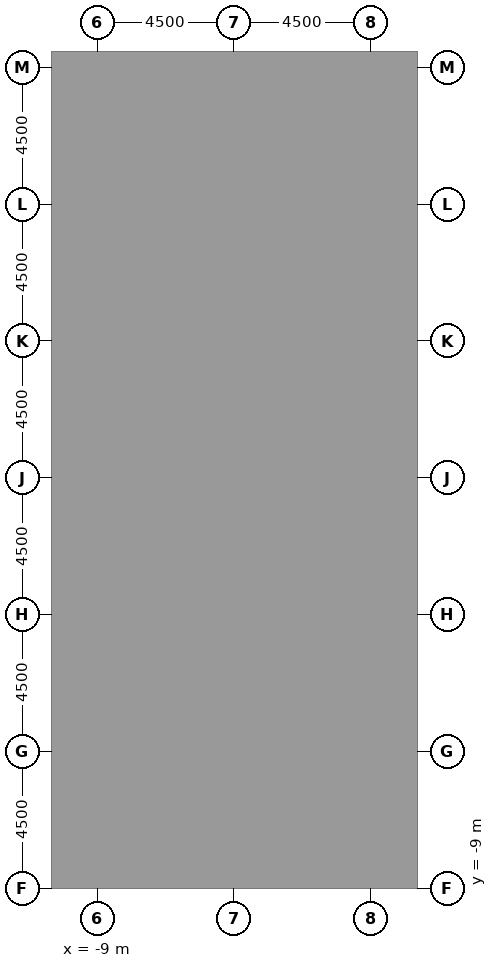
"""IFC4 building model, lengths in metres.
Left out: names, types, materials, properties, quantities, classifications, styles, units other than length and angle.
Written with IfcOpenShell. Run it as: python <this file> out.ifc"""

import sys

from ifc_helpers import new_model, si_unit, direction, frame, frame_2d, origin, place, context, subcontext, project, spatial, rectangle, extrude, element, fill, save


model = new_model("IFC4")
c1 = context("Model", 3, precision=1e-05, world=origin(), true_north=direction((0.0, 1.0)))
c2 = subcontext(c1, "Body", "Model", "MODEL_VIEW")
j1 = project(units=[si_unit("LENGTHUNIT", "METRE"), si_unit("PLANEANGLEUNIT", "RADIAN")], contexts=[c1])
p1 = place(None, origin())
s1 = spatial("IfcSite", under=j1, at=p1, CompositionType="ELEMENT")
p2 = place(p1, origin())
s2 = spatial("IfcBuilding", under=s1, at=p2, CompositionType="ELEMENT")
p3 = place(p2, origin())
s3 = spatial("IfcBuildingStorey", under=s2, at=p3, CompositionType="ELEMENT", Elevation=0.0)
p4 = place(p3, frame((-10.0, -9.0, 0.0), z_axis=(0.0, 0.0, 1.0), x_axis=(0.0, 1.0, 0.0)))
e1 = element("IfcWall", 1, at=p4, inside=s3, PredefinedType="SHEAR", context=c2, shape_type="SweptSolid", body=[
    extrude(rectangle(XDim=27.5, YDim=1.0, at=frame_2d((13.75, 0.0))), origin(), (0.0, 0.0, 1.0), 7.2),
])
p5 = place(p4, frame((12.55, 0.0, 0.0)))
e2 = element("IfcOpeningElement", 2, at=p5, cuts=e1, PredefinedType="OPENING", context=c2, shape_type="SweptSolid", body=[
    extrude(rectangle(XDim=2.4, YDim=2.4, at=frame_2d((1.2, 1.2))), frame((0.0, 0.51, 0.0), z_axis=(0.0, -1.0, 0.0), x_axis=(1.0, 0.0, 0.0)), (0.0, 0.0, 1.0), 1.02),
])
p6 = place(p4, frame((6.825, 0.0, 0.0)))
e3 = element("IfcOpeningElement", 3, at=p6, cuts=e1, PredefinedType="OPENING", context=c2, shape_type="SweptSolid", body=[
    extrude(rectangle(XDim=1.2, YDim=2.1, at=frame_2d((0.6, 1.05))), frame((0.0, 0.51, 0.0), z_axis=(0.0, -1.0, 0.0), x_axis=(1.0, 0.0, 0.0)), (0.0, 0.0, 1.0), 1.02),
])
p7 = place(p4, frame((19.475, 0.0, 0.0)))
e4 = element("IfcOpeningElement", 4, at=p7, cuts=e1, PredefinedType="OPENING", context=c2, shape_type="SweptSolid", body=[
    extrude(rectangle(XDim=1.2, YDim=2.1, at=frame_2d((0.6, 1.05))), frame((0.0, 0.51, 0.0), z_axis=(0.0, -1.0, 0.0), x_axis=(1.0, 0.0, 0.0)), (0.0, 0.0, 1.0), 1.02),
])
p8 = place(p3, frame((1.0, -9.0, 0.0), z_axis=(0.0, 0.0, 1.0), x_axis=(0.0, 1.0, 0.0)))
e5 = element("IfcWall", 5, at=p8, inside=s3, PredefinedType="SHEAR", context=c2, shape_type="SweptSolid", body=[
    extrude(rectangle(XDim=27.5, YDim=1.0, at=frame_2d((13.75, 0.0))), origin(), (0.0, 0.0, 1.0), 7.2),
])
p9 = place(p8, frame((12.55, 0.0, 0.0)))
e6 = element("IfcOpeningElement", 6, at=p9, cuts=e5, PredefinedType="OPENING", context=c2, shape_type="SweptSolid", body=[
    extrude(rectangle(XDim=2.4, YDim=2.4, at=frame_2d((1.2, 1.2))), frame((0.0, 0.51, 0.0), z_axis=(0.0, -1.0, 0.0), x_axis=(1.0, 0.0, 0.0)), (0.0, 0.0, 1.0), 1.02),
])
p10 = place(p8, frame((3.955, 0.0, 0.0)))
e7 = element("IfcOpeningElement", 7, at=p10, cuts=e5, PredefinedType="OPENING", context=c2, shape_type="SweptSolid", body=[
    extrude(rectangle(XDim=0.905, YDim=2.1, at=frame_2d((0.453, 1.05))), frame((0.0, 0.51, 0.0), z_axis=(0.0, -1.0, 0.0), x_axis=(1.0, 0.0, 0.0)), (0.0, 0.0, 1.0), 1.02),
])
p11 = place(p8, frame((23.363, 0.0, 0.0)))
e8 = element("IfcOpeningElement", 8, at=p11, cuts=e5, PredefinedType="OPENING", context=c2, shape_type="SweptSolid", body=[
    extrude(rectangle(XDim=1.2, YDim=2.1, at=frame_2d((0.6, 1.05))), frame((0.0, 0.51, 0.0), z_axis=(0.0, -1.0, 0.0), x_axis=(1.0, 0.0, 0.0)), (0.0, 0.0, 1.0), 1.02),
])
for number, where, z_axis, x_axis in (
    (9, (-9.5, -8.5, 0.0), (0.0, 0.0, 1.0), (1.0, 0.0, 0.0)),
    (10, (-9.5, 18.0, 0.0), (0.0, 0.0, 1.0), (1.0, 0.0, 0.0)),
):
    element("IfcWall", number, at=place(p3, frame(where, z_axis=z_axis, x_axis=x_axis)), inside=s3, PredefinedType="SHEAR", context=c2, shape_type="SweptSolid", body=[
        extrude(rectangle(XDim=10.0, YDim=1.0, at=frame_2d((5.0, 0.0))), origin(), (0.0, 0.0, 1.0), 7.2),
    ])
p12 = place(p3, frame((-9.5, -0.5, 0.0), z_axis=(0.0, 0.0, 1.0), x_axis=(1.0, 0.0, 0.0)))
e11 = element("IfcWall", 11, at=p12, inside=s3, PredefinedType="SHEAR", context=c2, shape_type="SweptSolid", body=[
    extrude(rectangle(XDim=10.0, YDim=0.5, at=frame_2d((5.0, 0.0))), origin(), (0.0, 0.0, 1.0), 7.2),
])
p13 = place(p3, frame((-9.5, 2.8, 0.0), z_axis=(0.0, 0.0, 1.0), x_axis=(1.0, 0.0, 0.0)))
e12 = element("IfcWall", 12, at=p13, inside=s3, PredefinedType="SHEAR", context=c2, shape_type="SweptSolid", body=[
    extrude(rectangle(XDim=10.0, YDim=0.5, at=frame_2d((5.0, 0.0))), origin(), (0.0, 0.0, 1.0), 7.2),
])
p14 = place(p13, frame((0.512, 0.0, 0.0)))
e13 = element("IfcOpeningElement", 13, at=p14, cuts=e12, PredefinedType="OPENING", context=c2, shape_type="SweptSolid", body=[
    extrude(rectangle(XDim=1.1, YDim=2.1, at=frame_2d((0.55, 1.05))), frame((0.0, 0.26, 0.0), z_axis=(0.0, -1.0, 0.0), x_axis=(1.0, 0.0, 0.0)), (0.0, 0.0, 1.0), 0.52),
])
p15 = place(p13, frame((3.137, 0.0, 0.0)))
e14 = element("IfcOpeningElement", 14, at=p15, cuts=e12, PredefinedType="OPENING", context=c2, shape_type="SweptSolid", body=[
    extrude(rectangle(XDim=1.1, YDim=2.1, at=frame_2d((0.55, 1.05))), frame((0.0, 0.26, 0.0), z_axis=(0.0, -1.0, 0.0), x_axis=(1.0, 0.0, 0.0)), (0.0, 0.0, 1.0), 0.52),
])
p16 = place(p13, frame((5.762, 0.0, 0.0)))
e15 = element("IfcOpeningElement", 15, at=p16, cuts=e12, PredefinedType="OPENING", context=c2, shape_type="SweptSolid", body=[
    extrude(rectangle(XDim=1.1, YDim=2.1, at=frame_2d((0.55, 1.05))), frame((0.0, 0.26, 0.0), z_axis=(0.0, -1.0, 0.0), x_axis=(1.0, 0.0, 0.0)), (0.0, 0.0, 1.0), 0.52),
])
p17 = place(p13, frame((8.387, 0.0, 0.0)))
e16 = element("IfcOpeningElement", 16, at=p17, cuts=e12, PredefinedType="OPENING", context=c2, shape_type="SweptSolid", body=[
    extrude(rectangle(XDim=1.1, YDim=2.1, at=frame_2d((0.55, 1.05))), frame((0.0, 0.26, 0.0), z_axis=(0.0, -1.0, 0.0), x_axis=(1.0, 0.0, 0.0)), (0.0, 0.0, 1.0), 0.52),
])
p18 = place(p3, frame((-9.5, 6.7, 0.0), z_axis=(0.0, 0.0, 1.0), x_axis=(1.0, 0.0, 0.0)))
e17 = element("IfcWall", 17, at=p18, inside=s3, PredefinedType="SHEAR", context=c2, shape_type="SweptSolid", body=[
    extrude(rectangle(XDim=10.0, YDim=0.5, at=frame_2d((5.0, 0.0))), origin(), (0.0, 0.0, 1.0), 7.2),
])
p19 = place(p18, frame((0.512, 0.0, 0.0)))
e18 = element("IfcOpeningElement", 18, at=p19, cuts=e17, PredefinedType="OPENING", context=c2, shape_type="SweptSolid", body=[
    extrude(rectangle(XDim=1.1, YDim=2.1, at=frame_2d((0.55, 1.05))), frame((0.0, 0.26, 0.0), z_axis=(0.0, -1.0, 0.0), x_axis=(1.0, 0.0, 0.0)), (0.0, 0.0, 1.0), 0.52),
])
p20 = place(p18, frame((3.188, 0.0, 0.0)))
e19 = element("IfcOpeningElement", 19, at=p20, cuts=e17, PredefinedType="OPENING", context=c2, shape_type="SweptSolid", body=[
    extrude(rectangle(XDim=1.0, YDim=2.1, at=frame_2d((0.5, 1.05))), frame((0.0, 0.26, 0.0), z_axis=(0.0, -1.0, 0.0), x_axis=(1.0, 0.0, 0.0)), (0.0, 0.0, 1.0), 0.52),
])
p21 = place(p18, frame((5.812, 0.0, 0.0)))
e20 = element("IfcOpeningElement", 20, at=p21, cuts=e17, PredefinedType="OPENING", context=c2, shape_type="SweptSolid", body=[
    extrude(rectangle(XDim=1.0, YDim=2.1, at=frame_2d((0.5, 1.05))), frame((0.0, 0.26, 0.0), z_axis=(0.0, -1.0, 0.0), x_axis=(1.0, 0.0, 0.0)), (0.0, 0.0, 1.0), 0.52),
])
p22 = place(p18, frame((8.438, 0.0, 0.0)))
e21 = element("IfcOpeningElement", 21, at=p22, cuts=e17, PredefinedType="OPENING", context=c2, shape_type="SweptSolid", body=[
    extrude(rectangle(XDim=1.0, YDim=2.1, at=frame_2d((0.5, 1.05))), frame((0.0, 0.26, 0.0), z_axis=(0.0, -1.0, 0.0), x_axis=(1.0, 0.0, 0.0)), (0.0, 0.0, 1.0), 0.52),
])
p23 = place(p3, frame((-9.5, 10.0, 0.0), z_axis=(0.0, 0.0, 1.0), x_axis=(1.0, 0.0, 0.0)))
e22 = element("IfcWall", 22, at=p23, inside=s3, PredefinedType="SHEAR", context=c2, shape_type="SweptSolid", body=[
    extrude(rectangle(XDim=10.0, YDim=0.5, at=frame_2d((5.0, 0.0))), origin(), (0.0, 0.0, 1.0), 7.2),
])
for number, where, z_axis, x_axis in (
    (23, (-7.125, -0.25, 0.0), (0.0, 0.0, 1.0), (0.0, 1.0, 0.0)),
    (24, (-7.125, 6.95, 0.0), (0.0, 0.0, 1.0), (0.0, 1.0, 0.0)),
    (25, (-4.5, -0.25, 0.0), (0.0, 0.0, 1.0), (0.0, 1.0, 0.0)),
    (26, (-4.5, 6.95, 0.0), (0.0, 0.0, 1.0), (0.0, 1.0, 0.0)),
    (27, (-1.875, -0.25, 0.0), (0.0, 0.0, 1.0), (0.0, 1.0, 0.0)),
    (28, (-1.875, 6.95, 0.0), (0.0, 0.0, 1.0), (0.0, 1.0, 0.0)),
):
    element("IfcWall", number, at=place(p3, frame(where, z_axis=z_axis, x_axis=x_axis)), inside=s3, PredefinedType="SHEAR", context=c2, shape_type="SweptSolid", body=[
        extrude(rectangle(XDim=2.8, YDim=0.5, at=frame_2d((1.4, 0.0))), origin(), (0.0, 0.0, 1.0), 7.2),
    ])
for number, where, z_axis, x_axis in (
    (29, (-4.5, -8.0, 0.0), (0.0, 0.0, 1.0), (0.0, 1.0, 0.0)),
    (30, (-4.5, 10.25, 0.0), (0.0, 0.0, 1.0), (0.0, 1.0, 0.0)),
):
    element("IfcWall", number, at=place(p3, frame(where, z_axis=z_axis, x_axis=x_axis)), inside=s3, PredefinedType="SHEAR", context=c2, shape_type="SweptSolid", body=[
        extrude(rectangle(XDim=7.25, YDim=0.5, at=frame_2d((3.625, 0.0))), origin(), (0.0, 0.0, 1.0), 7.2),
    ])
p24 = place(p3, frame((-4.25, -5.245, 0.0), z_axis=(0.0, 0.0, 1.0), x_axis=(1.0, 0.0, 0.0)))
e31 = element("IfcWall", 31, at=p24, inside=s3, PredefinedType="PARTITIONING", context=c2, shape_type="SweptSolid", body=[
    extrude(rectangle(XDim=4.75, YDim=0.1, at=frame_2d((2.375, 0.0))), origin(), (0.0, 0.0, 1.0), 6.75),
])
p25 = place(p24, frame((1.875, 0.0, 0.0)))
e32 = element("IfcOpeningElement", 32, at=p25, cuts=e31, PredefinedType="OPENING", context=c2, shape_type="SweptSolid", body=[
    extrude(rectangle(XDim=1.0, YDim=2.1, at=frame_2d((0.5, 1.05))), frame((0.0, 0.06, 0.0), z_axis=(0.0, -1.0, 0.0), x_axis=(1.0, 0.0, 0.0)), (0.0, 0.0, 1.0), 0.12),
])
p26 = place(p3, frame((-2.445, -3.94, 0.0), z_axis=(0.0, 0.0, 1.0), x_axis=(1.0, 0.0, 0.0)))
e33 = element("IfcWall", 33, at=p26, inside=s3, PredefinedType="PARTITIONING", context=c2, shape_type="SweptSolid", body=[
    extrude(rectangle(XDim=2.945, YDim=0.1, at=frame_2d((1.473, 0.0))), origin(), (0.0, 0.0, 1.0), 6.75),
])
p27 = place(p26, frame((0.972, 0.0, 0.0)))
e34 = element("IfcOpeningElement", 34, at=p27, cuts=e33, PredefinedType="OPENING", context=c2, shape_type="SweptSolid", body=[
    extrude(rectangle(XDim=1.0, YDim=2.1, at=frame_2d((0.5, 1.05))), frame((0.0, 0.06, 0.0), z_axis=(0.0, -1.0, 0.0), x_axis=(1.0, 0.0, 0.0)), (0.0, 0.0, 1.0), 0.12),
])
p28 = place(p3, frame((-4.25, -3.94, 0.0), z_axis=(0.0, 0.0, 1.0), x_axis=(1.0, 0.0, 0.0)))
e35 = element("IfcWall", 35, at=p28, inside=s3, PredefinedType="PARTITIONING", context=c2, shape_type="SweptSolid", body=[
    extrude(rectangle(XDim=1.805, YDim=0.1, at=frame_2d((0.902, 0.0))), origin(), (0.0, 0.0, 1.0), 6.75),
])
p29 = place(p28, frame((0.403, 0.0, 0.0)))
e36 = element("IfcOpeningElement", 36, at=p29, cuts=e35, PredefinedType="OPENING", context=c2, shape_type="SweptSolid", body=[
    extrude(rectangle(XDim=1.0, YDim=2.1, at=frame_2d((0.5, 1.05))), frame((0.0, 0.06, 0.0), z_axis=(0.0, -1.0, 0.0), x_axis=(1.0, 0.0, 0.0)), (0.0, 0.0, 1.0), 0.12),
])
p30 = place(p3, frame((-2.445, -3.94, 0.0), z_axis=(0.0, 0.0, 1.0), x_axis=(0.0, 1.0, 0.0)))
e37 = element("IfcWall", 37, at=p30, inside=s3, PredefinedType="PARTITIONING", context=c2, shape_type="SweptSolid", body=[
    extrude(rectangle(XDim=3.19, YDim=0.1, at=frame_2d((1.595, 0.0))), origin(), (0.0, 0.0, 1.0), 6.75),
])
p31 = place(p3, frame((-0.8, 12.425, 0.0), z_axis=(0.0, 0.0, 1.0), x_axis=(1.0, 0.0, 0.0)))
e38 = element("IfcWall", 38, at=p31, inside=s3, PredefinedType="PARTITIONING", context=c2, shape_type="SweptSolid", body=[
    extrude(rectangle(XDim=1.3, YDim=0.1, at=frame_2d((0.65, 0.0))), origin(), (0.0, 0.0, 1.0), 6.75),
])
p32 = place(p31, frame((0.2, 0.0, 0.0)))
e39 = element("IfcOpeningElement", 39, at=p32, cuts=e38, PredefinedType="OPENING", context=c2, shape_type="SweptSolid", body=[
    extrude(rectangle(XDim=0.9, YDim=2.1, at=frame_2d((0.45, 1.05))), frame((0.0, 0.06, 0.0), z_axis=(0.0, -1.0, 0.0), x_axis=(1.0, 0.0, 0.0)), (0.0, 0.0, 1.0), 0.12),
])
p33 = place(p3, frame((-4.25, 12.425, 0.0), z_axis=(0.0, 0.0, 1.0), x_axis=(1.0, 0.0, 0.0)))
e40 = element("IfcWall", 40, at=p33, inside=s3, PredefinedType="PARTITIONING", context=c2, shape_type="SweptSolid", body=[
    extrude(rectangle(XDim=3.45, YDim=0.1, at=frame_2d((1.725, 0.0))), origin(), (0.0, 0.0, 1.0), 6.75),
])
p34 = place(p3, frame((-0.8, 12.425, 0.0), z_axis=(0.0, 0.0, 1.0), x_axis=(0.0, 1.0, 0.0)))
e41 = element("IfcWall", 41, at=p34, inside=s3, PredefinedType="PARTITIONING", context=c2, shape_type="SweptSolid", body=[
    extrude(rectangle(XDim=2.537, YDim=0.1, at=frame_2d((1.269, 0.0))), origin(), (0.0, 0.0, 1.0), 6.75),
])
p35 = place(p34, frame((0.769, 0.0, 0.0)))
e42 = element("IfcOpeningElement", 42, at=p35, cuts=e41, PredefinedType="OPENING", context=c2, shape_type="SweptSolid", body=[
    extrude(rectangle(XDim=1.0, YDim=2.1, at=frame_2d((0.5, 1.05))), frame((0.0, 0.06, 0.0), z_axis=(0.0, -1.0, 0.0), x_axis=(1.0, 0.0, 0.0)), (0.0, 0.0, 1.0), 0.12),
])
p36 = place(p3, frame((-0.8, 14.962, 0.0), z_axis=(0.0, 0.0, 1.0), x_axis=(0.0, 1.0, 0.0)))
e43 = element("IfcWall", 43, at=p36, inside=s3, PredefinedType="PARTITIONING", context=c2, shape_type="SweptSolid", body=[
    extrude(rectangle(XDim=2.538, YDim=0.1, at=frame_2d((1.269, 0.0))), origin(), (0.0, 0.0, 1.0), 6.75),
])
p37 = place(p36, frame((0.769, 0.0, 0.0)))
e44 = element("IfcOpeningElement", 44, at=p37, cuts=e43, PredefinedType="OPENING", context=c2, shape_type="SweptSolid", body=[
    extrude(rectangle(XDim=1.0, YDim=2.1, at=frame_2d((0.5, 1.05))), frame((0.0, 0.06, 0.0), z_axis=(0.0, -1.0, 0.0), x_axis=(1.0, 0.0, 0.0)), (0.0, 0.0, 1.0), 0.12),
])
p38 = place(p3, frame((-4.25, 14.962, 0.0), z_axis=(0.0, 0.0, 1.0), x_axis=(1.0, 0.0, 0.0)))
e45 = element("IfcWall", 45, at=p38, inside=s3, PredefinedType="PARTITIONING", context=c2, shape_type="SweptSolid", body=[
    extrude(rectangle(XDim=3.45, YDim=0.1, at=frame_2d((1.725, 0.0))), origin(), (0.0, 0.0, 1.0), 6.75),
])
p39 = place(p3, frame((-12.7, -9.0, 0.0), z_axis=(0.0, 0.0, 1.0), x_axis=(1.0, 0.0, 0.0)))
e46 = element("IfcWall", 46, at=p39, inside=s3, PredefinedType="PARTITIONING", context=c2, shape_type="SweptSolid", body=[
    extrude(rectangle(XDim=2.2, YDim=0.15, at=frame_2d((1.1, 0.0))), origin(), (0.0, 0.0, 1.0), 6.75),
])
p40 = place(p39, frame((0.25, 0.0, 0.0)))
e47 = element("IfcOpeningElement", 47, at=p40, cuts=e46, PredefinedType="OPENING", context=c2, shape_type="SweptSolid", body=[
    extrude(rectangle(XDim=1.7, YDim=2.1, at=frame_2d((0.85, 1.05))), frame((0.0, 0.085, 0.0), z_axis=(0.0, -1.0, 0.0), x_axis=(1.0, 0.0, 0.0)), (0.0, 0.0, 1.0), 0.17),
])
p41 = place(p3, frame((-12.7, 18.5, 0.0), z_axis=(0.0, 0.0, 1.0), x_axis=(1.0, 0.0, 0.0)))
e48 = element("IfcWall", 48, at=p41, inside=s3, PredefinedType="PARTITIONING", context=c2, shape_type="SweptSolid", body=[
    extrude(rectangle(XDim=2.2, YDim=0.15, at=frame_2d((1.1, 0.0))), origin(), (0.0, 0.0, 1.0), 6.75),
])
p42 = place(p41, frame((0.25, 0.0, 0.0)))
e49 = element("IfcOpeningElement", 49, at=p42, cuts=e48, PredefinedType="OPENING", context=c2, shape_type="SweptSolid", body=[
    extrude(rectangle(XDim=1.7, YDim=2.1, at=frame_2d((0.85, 1.05))), frame((0.0, 0.085, 0.0), z_axis=(0.0, -1.0, 0.0), x_axis=(1.0, 0.0, 0.0)), (0.0, 0.0, 1.0), 0.17),
])
p43 = place(p14, origin())
e50 = element("IfcDoor", 50, at=p43, inside=s3, OperationType="DOUBLE_DOOR_SLIDING", PredefinedType="DOOR", context=c2, shape_type="SweptSolid", body=[
    extrude(rectangle(XDim=1.1, YDim=2.1, at=frame_2d((0.55, 1.05))), frame((0.0, 0.025, 0.0), z_axis=(0.0, -1.0, 0.0), x_axis=(1.0, 0.0, 0.0)), (0.0, 0.0, 1.0), 0.05),
])
fill(e13, e50)
p44 = place(p15, origin())
e51 = element("IfcDoor", 51, at=p44, inside=s3, OperationType="DOUBLE_DOOR_SLIDING", PredefinedType="DOOR", context=c2, shape_type="SweptSolid", body=[
    extrude(rectangle(XDim=1.1, YDim=2.1, at=frame_2d((0.55, 1.05))), frame((0.0, 0.025, 0.0), z_axis=(0.0, -1.0, 0.0), x_axis=(1.0, 0.0, 0.0)), (0.0, 0.0, 1.0), 0.05),
])
fill(e14, e51)
p45 = place(p16, origin())
e52 = element("IfcDoor", 52, at=p45, inside=s3, OperationType="DOUBLE_DOOR_SLIDING", PredefinedType="DOOR", context=c2, shape_type="SweptSolid", body=[
    extrude(rectangle(XDim=1.1, YDim=2.1, at=frame_2d((0.55, 1.05))), frame((0.0, 0.025, 0.0), z_axis=(0.0, -1.0, 0.0), x_axis=(1.0, 0.0, 0.0)), (0.0, 0.0, 1.0), 0.05),
])
fill(e15, e52)
p46 = place(p17, origin())
e53 = element("IfcDoor", 53, at=p46, inside=s3, OperationType="DOUBLE_DOOR_SLIDING", PredefinedType="DOOR", context=c2, shape_type="SweptSolid", body=[
    extrude(rectangle(XDim=1.1, YDim=2.1, at=frame_2d((0.55, 1.05))), frame((0.0, 0.025, 0.0), z_axis=(0.0, -1.0, 0.0), x_axis=(1.0, 0.0, 0.0)), (0.0, 0.0, 1.0), 0.05),
])
fill(e16, e53)
p47 = place(p19, origin())
e54 = element("IfcDoor", 54, at=p47, inside=s3, OperationType="DOUBLE_DOOR_SLIDING", PredefinedType="DOOR", context=c2, shape_type="SweptSolid", body=[
    extrude(rectangle(XDim=1.1, YDim=2.1, at=frame_2d((0.55, 1.05))), frame((0.0, 0.025, 0.0), z_axis=(0.0, -1.0, 0.0), x_axis=(1.0, 0.0, 0.0)), (0.0, 0.0, 1.0), 0.05),
])
fill(e18, e54)
p48 = place(p5, origin())
e55 = element("IfcDoor", 55, at=p48, inside=s3, OperationType="DOUBLE_DOOR_DOUBLE_SWING", PredefinedType="DOOR", context=c2, shape_type="SweptSolid", body=[
    extrude(rectangle(XDim=2.4, YDim=2.4, at=frame_2d((1.2, 1.2))), frame((0.0, 0.025, 0.0), z_axis=(0.0, -1.0, 0.0), x_axis=(1.0, 0.0, 0.0)), (0.0, 0.0, 1.0), 0.05),
])
fill(e2, e55)
p49 = place(p9, origin())
e56 = element("IfcDoor", 56, at=p49, inside=s3, OperationType="DOUBLE_DOOR_DOUBLE_SWING", PredefinedType="DOOR", context=c2, shape_type="SweptSolid", body=[
    extrude(rectangle(XDim=2.4, YDim=2.4, at=frame_2d((1.2, 1.2))), frame((0.0, 0.025, 0.0), z_axis=(0.0, -1.0, 0.0), x_axis=(1.0, 0.0, 0.0)), (0.0, 0.0, 1.0), 0.05),
])
fill(e6, e56)
p50 = place(p6, origin())
e57 = element("IfcDoor", 57, at=p50, inside=s3, OperationType="SINGLE_SWING_LEFT", PredefinedType="DOOR", context=c2, shape_type="SweptSolid", body=[
    extrude(rectangle(XDim=1.2, YDim=2.1, at=frame_2d((0.6, 1.05))), frame((0.0, 0.025, 0.0), z_axis=(0.0, -1.0, 0.0), x_axis=(1.0, 0.0, 0.0)), (0.0, 0.0, 1.0), 0.05),
])
fill(e3, e57)
p51 = place(p7, origin())
e58 = element("IfcDoor", 58, at=p51, inside=s3, OperationType="SINGLE_SWING_LEFT", PredefinedType="DOOR", context=c2, shape_type="SweptSolid", body=[
    extrude(rectangle(XDim=1.2, YDim=2.1, at=frame_2d((0.6, 1.05))), frame((0.0, 0.025, 0.0), z_axis=(0.0, -1.0, 0.0), x_axis=(1.0, 0.0, 0.0)), (0.0, 0.0, 1.0), 0.05),
])
fill(e4, e58)
p52 = place(p20, origin())
e59 = element("IfcDoor", 59, at=p52, inside=s3, OperationType="SINGLE_SWING_RIGHT", PredefinedType="DOOR", context=c2, shape_type="SweptSolid", body=[
    extrude(rectangle(XDim=1.0, YDim=2.1, at=frame_2d((0.5, 1.05))), frame((0.0, 0.025, 0.0), z_axis=(0.0, -1.0, 0.0), x_axis=(1.0, 0.0, 0.0)), (0.0, 0.0, 1.0), 0.05),
])
fill(e19, e59)
p53 = place(p21, origin())
e60 = element("IfcDoor", 60, at=p53, inside=s3, OperationType="SINGLE_SWING_LEFT", PredefinedType="DOOR", context=c2, shape_type="SweptSolid", body=[
    extrude(rectangle(XDim=1.0, YDim=2.1, at=frame_2d((0.5, 1.05))), frame((0.0, 0.025, 0.0), z_axis=(0.0, -1.0, 0.0), x_axis=(1.0, 0.0, 0.0)), (0.0, 0.0, 1.0), 0.05),
])
fill(e20, e60)
p54 = place(p22, origin())
e61 = element("IfcDoor", 61, at=p54, inside=s3, OperationType="SINGLE_SWING_RIGHT", PredefinedType="DOOR", context=c2, shape_type="SweptSolid", body=[
    extrude(rectangle(XDim=1.0, YDim=2.1, at=frame_2d((0.5, 1.05))), frame((0.0, 0.025, 0.0), z_axis=(0.0, -1.0, 0.0), x_axis=(1.0, 0.0, 0.0)), (0.0, 0.0, 1.0), 0.05),
])
fill(e21, e61)
p55 = place(p10, origin())
e62 = element("IfcDoor", 62, at=p55, inside=s3, OperationType="SINGLE_SWING_LEFT", PredefinedType="DOOR", context=c2, shape_type="SweptSolid", body=[
    extrude(rectangle(XDim=0.905, YDim=2.1, at=frame_2d((0.453, 1.05))), frame((0.0, 0.475, 0.0), z_axis=(0.0, -1.0, 0.0), x_axis=(1.0, 0.0, 0.0)), (0.0, 0.0, 1.0), 0.05),
])
fill(e7, e62)
p56 = place(p25, origin())
e63 = element("IfcDoor", 63, at=p56, inside=s3, OperationType="SINGLE_SWING_RIGHT", PredefinedType="DOOR", context=c2, shape_type="SweptSolid", body=[
    extrude(rectangle(XDim=1.0, YDim=2.1, at=frame_2d((0.5, 1.05))), frame((0.0, 0.025, 0.0), z_axis=(0.0, -1.0, 0.0), x_axis=(1.0, 0.0, 0.0)), (0.0, 0.0, 1.0), 0.05),
])
fill(e32, e63)
p57 = place(p27, origin())
e64 = element("IfcDoor", 64, at=p57, inside=s3, OperationType="SINGLE_SWING_LEFT", PredefinedType="DOOR", context=c2, shape_type="SweptSolid", body=[
    extrude(rectangle(XDim=1.0, YDim=2.1, at=frame_2d((0.5, 1.05))), frame((0.0, 0.025, 0.0), z_axis=(0.0, -1.0, 0.0), x_axis=(1.0, 0.0, 0.0)), (0.0, 0.0, 1.0), 0.05),
])
fill(e34, e64)
p58 = place(p29, origin())
e65 = element("IfcDoor", 65, at=p58, inside=s3, OperationType="SINGLE_SWING_RIGHT", PredefinedType="DOOR", context=c2, shape_type="SweptSolid", body=[
    extrude(rectangle(XDim=1.0, YDim=2.1, at=frame_2d((0.5, 1.05))), frame((0.0, 0.025, 0.0), z_axis=(0.0, -1.0, 0.0), x_axis=(1.0, 0.0, 0.0)), (0.0, 0.0, 1.0), 0.05),
])
fill(e36, e65)
p59 = place(p32, origin())
e66 = element("IfcDoor", 66, at=p59, inside=s3, OperationType="SINGLE_SWING_LEFT", PredefinedType="DOOR", context=c2, shape_type="SweptSolid", body=[
    extrude(rectangle(XDim=0.9, YDim=2.1, at=frame_2d((0.45, 1.05))), frame((0.0, 0.025, 0.0), z_axis=(0.0, -1.0, 0.0), x_axis=(1.0, 0.0, 0.0)), (0.0, 0.0, 1.0), 0.05),
])
fill(e39, e66)
p60 = place(p11, origin())
e67 = element("IfcDoor", 67, at=p60, inside=s3, OperationType="SINGLE_SWING_RIGHT", PredefinedType="DOOR", context=c2, shape_type="SweptSolid", body=[
    extrude(rectangle(XDim=1.2, YDim=2.1, at=frame_2d((0.6, 1.05))), frame((0.0, 0.475, 0.0), z_axis=(0.0, -1.0, 0.0), x_axis=(1.0, 0.0, 0.0)), (0.0, 0.0, 1.0), 0.05),
])
fill(e8, e67)
p61 = place(p35, origin())
e68 = element("IfcDoor", 68, at=p61, inside=s3, OperationType="SINGLE_SWING_LEFT", PredefinedType="DOOR", context=c2, shape_type="SweptSolid", body=[
    extrude(rectangle(XDim=1.0, YDim=2.1, at=frame_2d((0.5, 1.05))), frame((0.0, 0.025, 0.0), z_axis=(0.0, -1.0, 0.0), x_axis=(1.0, 0.0, 0.0)), (0.0, 0.0, 1.0), 0.05),
])
fill(e42, e68)
p62 = place(p37, origin())
e69 = element("IfcDoor", 69, at=p62, inside=s3, OperationType="SINGLE_SWING_RIGHT", PredefinedType="DOOR", context=c2, shape_type="SweptSolid", body=[
    extrude(rectangle(XDim=1.0, YDim=2.1, at=frame_2d((0.5, 1.05))), frame((0.0, 0.025, 0.0), z_axis=(0.0, -1.0, 0.0), x_axis=(1.0, 0.0, 0.0)), (0.0, 0.0, 1.0), 0.05),
])
fill(e44, e69)
save(model, sys.argv[1])
